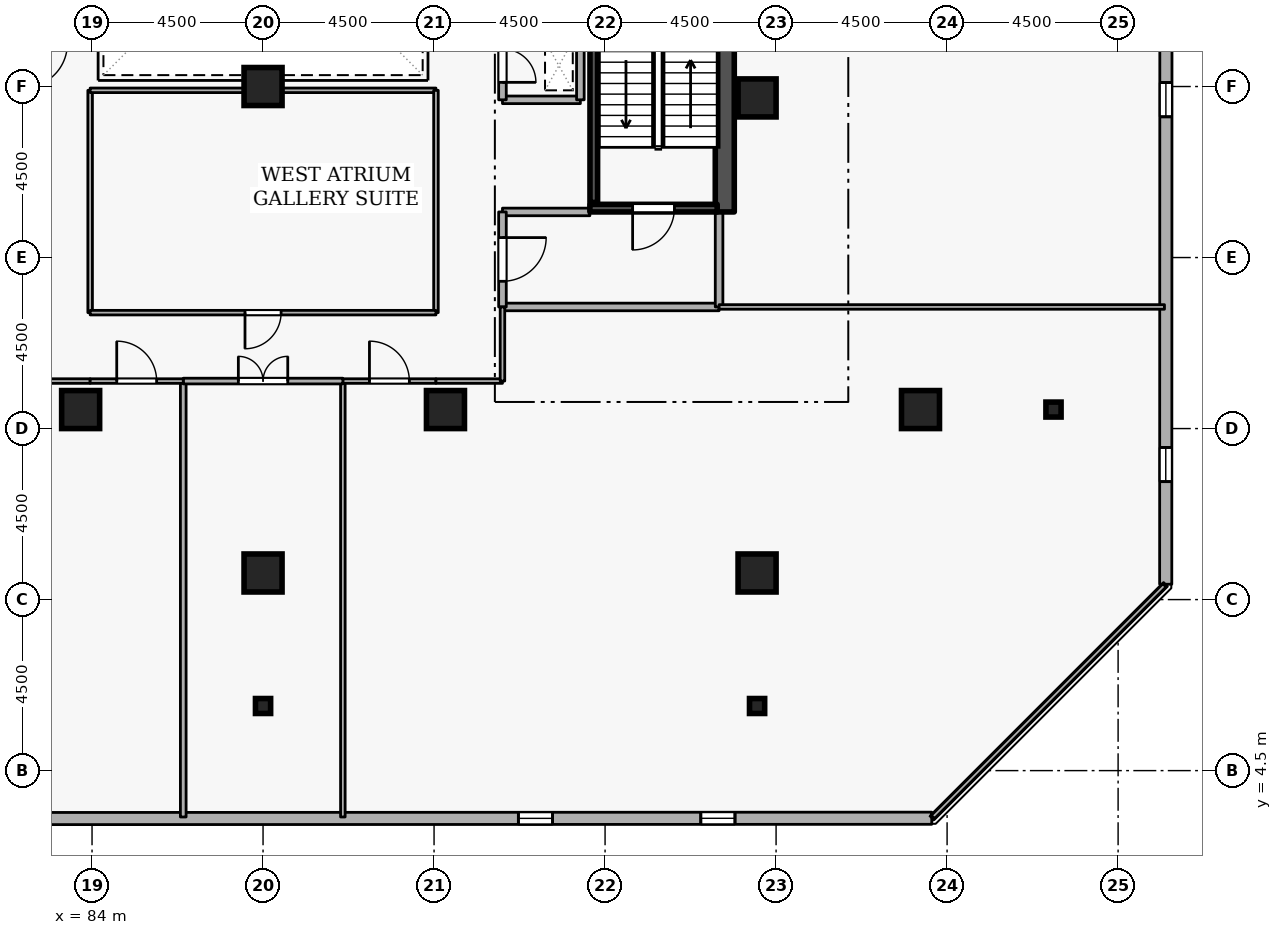
"""IFC4 building model, lengths in metres.
Left out: names, types, materials, properties, quantities, classifications, styles, units other than length and angle.
Written with IfcOpenShell. Run it as: python <this file> out.ifc"""

import sys

from ifc_helpers import new_model, si_unit, direction, frame, frame_2d, origin, origin_2d, place, context, subcontext, project, spatial, rectangle, i_section, extrude, element, fill, save


model = new_model("IFC4")
c1 = context("Model", 3, precision=1e-05, world=origin(), true_north=direction((0.0, 1.0)))
c2 = subcontext(c1, "Body", "Model", "MODEL_VIEW")
j1 = project(units=[si_unit("LENGTHUNIT", "METRE"), si_unit("PLANEANGLEUNIT", "RADIAN")], contexts=[c1])
p1 = place(None, origin())
s1 = spatial("IfcSite", under=j1, at=p1, CompositionType="ELEMENT")
p2 = place(p1, origin())
s2 = spatial("IfcBuilding", under=s1, at=p2, CompositionType="ELEMENT")
p3 = place(p2, frame((0.0, 0.0, 229.5)))
s3 = spatial("IfcBuildingStorey", under=s2, at=p3, CompositionType="ELEMENT", Elevation=229.5)
p4 = place(p3, frame((100.65, 19.2, 0.0), z_axis=(0.0, 0.0, 1.0), x_axis=(0.0, 1.0, 0.0)))
e1 = element("IfcWall", 1, at=p4, inside=s3, PredefinedType="SHEAR", context=c2, shape_type="SweptSolid", body=[
    extrude(rectangle(XDim=15.6, YDim=0.5, at=frame_2d((7.8, 0.0))), origin(), (0.0, 0.0, 1.0), 3.6),
])
for number, where, z_axis, x_axis in (
    (2, (105.8, 14.0, 0.0), (0.0, 0.0, 1.0), (1.0, 0.0, 0.0)),
    (3, (101.5, 9.7, 0.0), (0.0, 0.0, 1.0), (1.0, 0.0, 0.0)),
    (4, (88.5, 9.7, 0.0), (0.0, 0.0, 1.0), (1.0, 0.0, 0.0)),
    (5, (93.3, 14.0, 0.0), (0.0, 0.0, 1.0), (1.0, 0.0, 0.0)),
    (6, (83.7, 14.0, 0.0), (0.0, 0.0, 1.0), (1.0, 0.0, 0.0)),
    (7, (101.5, 22.2, 0.0), (0.0, 0.0, 1.0), (1.0, 0.0, 0.0)),
    (8, (88.5, 22.5, 0.0), (0.0, 0.0, 1.0), (1.0, 0.0, 0.0)),
):
    element("IfcColumn", number, at=place(p3, frame(where, z_axis=z_axis, x_axis=x_axis)), inside=s3, PredefinedType="COLUMN", context=c2, shape_type="SweptSolid", body=[
        extrude(rectangle(XDim=1.0, YDim=1.0, at=origin_2d()), origin(), (0.0, 0.0, 1.0), 3.6),
    ])
for number, where, z_axis, x_axis in (
    (9, (109.3, 14.0, 0.0), (0.0, 0.0, 1.0), (1.0, 0.0, 0.0)),
    (10, (101.5, 6.2, 0.0), (0.0, 0.0, 1.0), (1.0, 0.0, 0.0)),
    (11, (88.5, 6.2, 0.0), (0.0, 0.0, 1.0), (1.0, 0.0, 0.0)),
):
    element("IfcColumn", number, at=place(p3, frame(where, z_axis=z_axis, x_axis=x_axis)), inside=s3, PredefinedType="COLUMN", context=c2, shape_type="SweptSolid", body=[
        extrude(i_section(OverallWidth=0.399, OverallDepth=0.394, WebThickness=0.023, FlangeThickness=0.037, FilletRadius=0.015, at=origin_2d()), origin(), (0.0, 0.0, 1.0), 3.6),
    ])
p5 = place(p3, frame((73.319, 3.235, 0.0), z_axis=(0.0, 0.0, 1.0), x_axis=(0.999999933399, 0.000364968916, 0.0)))
e12 = element("IfcWall", 12, at=p5, inside=s3, PredefinedType="STANDARD", context=c2, shape_type="SweptSolid", body=[
    extrude(rectangle(XDim=32.778, YDim=0.32, at=frame_2d((16.389, 0.0))), origin(), (0.0, 0.0, 1.0), 2.7),
])
p6 = place(p5, frame((2.7, 0.0, 0.72)))
e13 = element("IfcOpeningElement", 13, at=p6, cuts=e12, PredefinedType="OPENING", context=c2, shape_type="SweptSolid", body=[
    extrude(rectangle(XDim=0.9, YDim=1.75, at=frame_2d((0.45, 0.875))), frame((0.0, 0.17, 0.0), z_axis=(0.0, -1.0, 0.0), x_axis=(1.0, 0.0, 0.0)), (0.0, 0.0, 1.0), 0.34),
])
p7 = place(p5, frame((7.5, 0.0, 0.72)))
e14 = element("IfcOpeningElement", 14, at=p7, cuts=e12, PredefinedType="OPENING", context=c2, shape_type="SweptSolid", body=[
    extrude(rectangle(XDim=0.9, YDim=1.75, at=frame_2d((0.45, 0.875))), frame((0.0, 0.17, 0.0), z_axis=(0.0, -1.0, 0.0), x_axis=(1.0, 0.0, 0.0)), (0.0, 0.0, 1.0), 0.34),
])
p8 = place(p5, frame((21.9, 0.0, 0.72)))
e15 = element("IfcOpeningElement", 15, at=p8, cuts=e12, PredefinedType="OPENING", context=c2, shape_type="SweptSolid", body=[
    extrude(rectangle(XDim=0.9, YDim=1.75, at=frame_2d((0.45, 0.875))), frame((0.0, 0.17, 0.0), z_axis=(0.0, -1.0, 0.0), x_axis=(1.0, 0.0, 0.0)), (0.0, 0.0, 1.0), 0.34),
])
p9 = place(p5, frame((26.7, 0.0, 0.72)))
e16 = element("IfcOpeningElement", 16, at=p9, cuts=e12, PredefinedType="OPENING", context=c2, shape_type="SweptSolid", body=[
    extrude(rectangle(XDim=0.9, YDim=1.75, at=frame_2d((0.45, 0.875))), frame((0.0, 0.17, 0.0), z_axis=(0.0, -1.0, 0.0), x_axis=(1.0, 0.0, 0.0)), (0.0, 0.0, 1.0), 0.34),
])
p10 = place(p3, frame((112.253, 9.404, 0.0), z_axis=(0.0, 0.0, 1.0), x_axis=(0.000364968916, 0.999999933399, 0.0)))
e17 = element("IfcWall", 17, at=p10, inside=s3, PredefinedType="STANDARD", context=c2, shape_type="SweptSolid", body=[
    extrude(rectangle(XDim=32.778, YDim=0.32, at=frame_2d((16.389, 0.0))), origin(), (0.0, 0.0, 1.0), 2.7),
])
p11 = place(p10, frame((2.7, 0.0, 0.72)))
e18 = element("IfcOpeningElement", 18, at=p11, cuts=e17, PredefinedType="OPENING", context=c2, shape_type="SweptSolid", body=[
    extrude(rectangle(XDim=0.9, YDim=1.75, at=frame_2d((0.45, 0.875))), frame((0.0, 0.17, 0.0), z_axis=(0.0, -1.0, 0.0), x_axis=(1.0, 0.0, 0.0)), (0.0, 0.0, 1.0), 0.34),
])
p12 = place(p10, frame((12.3, 0.0, 0.72)))
e19 = element("IfcOpeningElement", 19, at=p12, cuts=e17, PredefinedType="OPENING", context=c2, shape_type="SweptSolid", body=[
    extrude(rectangle(XDim=0.9, YDim=1.75, at=frame_2d((0.45, 0.875))), frame((0.0, 0.17, 0.0), z_axis=(0.0, -1.0, 0.0), x_axis=(1.0, 0.0, 0.0)), (0.0, 0.0, 1.0), 0.34),
])
p13 = place(p10, frame((17.1, 0.0, 0.72)))
e20 = element("IfcOpeningElement", 20, at=p13, cuts=e17, PredefinedType="OPENING", context=c2, shape_type="SweptSolid", body=[
    extrude(rectangle(XDim=0.9, YDim=1.75, at=frame_2d((0.45, 0.875))), frame((0.0, 0.17, 0.0), z_axis=(0.0, -1.0, 0.0), x_axis=(1.0, 0.0, 0.0)), (0.0, 0.0, 1.0), 0.34),
])
p14 = place(p10, frame((21.9, 0.0, 0.72)))
e21 = element("IfcOpeningElement", 21, at=p14, cuts=e17, PredefinedType="OPENING", context=c2, shape_type="SweptSolid", body=[
    extrude(rectangle(XDim=0.9, YDim=1.75, at=frame_2d((0.45, 0.875))), frame((0.0, 0.17, 0.0), z_axis=(0.0, -1.0, 0.0), x_axis=(1.0, 0.0, 0.0)), (0.0, 0.0, 1.0), 0.34),
])
p15 = place(p10, frame((26.7, 0.0, 0.72)))
e22 = element("IfcOpeningElement", 22, at=p15, cuts=e17, PredefinedType="OPENING", context=c2, shape_type="SweptSolid", body=[
    extrude(rectangle(XDim=0.9, YDim=1.75, at=frame_2d((0.45, 0.875))), frame((0.0, 0.17, 0.0), z_axis=(0.0, -1.0, 0.0), x_axis=(1.0, 0.0, 0.0)), (0.0, 0.0, 1.0), 0.34),
])
p16 = place(p3, frame((100.45, 19.3, 0.0), z_axis=(0.0, 0.0, 1.0), x_axis=(-1.0, 0.0, 0.0)))
e23 = element("IfcWall", 23, at=p16, inside=s3, PredefinedType="SHEAR", context=c2, shape_type="SweptSolid", body=[
    extrude(rectangle(XDim=3.35, YDim=0.2, at=frame_2d((1.675, 0.0))), origin(), (0.0, 0.0, 1.0), 3.6),
])
p17 = place(p16, frame((1.125, 0.0, 0.0)))
e24 = element("IfcOpeningElement", 24, at=p17, cuts=e23, PredefinedType="OPENING", context=c2, shape_type="SweptSolid", body=[
    extrude(rectangle(XDim=1.1, YDim=2.1, at=frame_2d((0.55, 1.05))), frame((0.0, 0.11, 0.0), z_axis=(0.0, -1.0, 0.0), x_axis=(1.0, 0.0, 0.0)), (0.0, 0.0, 1.0), 0.22),
])
p18 = place(p3, frame((97.203, 26.55, 0.0), z_axis=(0.0, 0.0, 1.0), x_axis=(0.0, -1.0, 0.0)))
e25 = element("IfcWall", 25, at=p18, inside=s3, PredefinedType="SHEAR", context=c2, shape_type="SweptSolid", body=[
    extrude(rectangle(XDim=7.1, YDim=0.2, at=frame_2d((3.55, 0.0))), origin(), (0.0, 0.0, 1.0), 3.6),
])
p19 = place(p3, frame((94.8, 16.7, 0.0), z_axis=(0.0, 0.0, 1.0), x_axis=(1.0, 0.0, 0.0)))
e26 = element("IfcWall", 26, at=p19, inside=s3, PredefinedType="STANDARD", context=c2, shape_type="SweptSolid", body=[
    extrude(rectangle(XDim=5.7, YDim=0.2, at=frame_2d((2.85, 0.0))), origin(), (0.0, 0.0, 1.0), 3.3),
])
p20 = place(p3, frame((100.5, 16.7, 0.0), z_axis=(0.0, 0.0, 1.0), x_axis=(0.0, 1.0, 0.0)))
e27 = element("IfcWall", 27, at=p20, inside=s3, PredefinedType="STANDARD", context=c2, shape_type="SweptSolid", body=[
    extrude(rectangle(XDim=2.5, YDim=0.2, at=frame_2d((1.25, 0.0))), origin(), (0.0, 0.0, 1.0), 3.3),
])
p21 = place(p3, frame((97.1, 19.2, 0.0), z_axis=(0.0, 0.0, 1.0), x_axis=(-1.0, 0.0, 0.0)))
e28 = element("IfcWall", 28, at=p21, inside=s3, PredefinedType="STANDARD", context=c2, shape_type="SweptSolid", body=[
    extrude(rectangle(XDim=2.3, YDim=0.2, at=frame_2d((1.15, 0.0))), origin(), (0.0, 0.0, 1.0), 2.505),
])
p22 = place(p3, frame((94.8, 19.2, 0.0), z_axis=(0.0, 0.0, 1.0), x_axis=(0.0, -1.0, 0.0)))
e29 = element("IfcWall", 29, at=p22, inside=s3, PredefinedType="STANDARD", context=c2, shape_type="SweptSolid", body=[
    extrude(rectangle(XDim=2.5, YDim=0.2, at=frame_2d((1.25, 0.0))), origin(), (0.0, 0.0, 1.0), 3.3),
])
p23 = place(p22, frame((0.675, 0.0, 0.0)))
e30 = element("IfcOpeningElement", 30, at=p23, cuts=e29, PredefinedType="OPENING", context=c2, shape_type="SweptSolid", body=[
    extrude(rectangle(XDim=1.15, YDim=2.1, at=frame_2d((0.575, 1.05))), frame((0.0, 0.11, 0.0), z_axis=(0.0, -1.0, 0.0), x_axis=(1.0, 0.0, 0.0)), (0.0, 0.0, 1.0), 0.22),
])
p24 = place(p3, frame((94.8, 22.15, 0.0), z_axis=(0.0, 0.0, 1.0), x_axis=(1.0, 0.0, 0.0)))
e31 = element("IfcWall", 31, at=p24, inside=s3, PredefinedType="STANDARD", context=c2, shape_type="SweptSolid", body=[
    extrude(rectangle(XDim=2.05, YDim=0.2, at=frame_2d((1.025, 0.0))), origin(), (0.0, 0.0, 1.0), 3.3),
])
p25 = place(p3, frame((96.85, 22.15, 0.0), z_axis=(0.0, 0.0, 1.0), x_axis=(0.0, 1.0, 0.0)))
e32 = element("IfcWall", 32, at=p25, inside=s3, PredefinedType="STANDARD", context=c2, shape_type="SweptSolid", body=[
    extrude(rectangle(XDim=1.8, YDim=0.2, at=frame_2d((0.9, 0.0))), origin(), (0.0, 0.0, 1.0), 3.3),
])
p26 = place(p3, frame((94.8, 23.95, 0.0), z_axis=(0.0, 0.0, 1.0), x_axis=(0.0, -1.0, 0.0)))
e33 = element("IfcWall", 33, at=p26, inside=s3, PredefinedType="STANDARD", context=c2, shape_type="SweptSolid", body=[
    extrude(rectangle(XDim=1.8, YDim=0.2, at=frame_2d((0.9, 0.0))), origin(), (0.0, 0.0, 1.0), 3.3),
])
p27 = place(p26, frame((0.46, 0.0, 0.0)))
e34 = element("IfcOpeningElement", 34, at=p27, cuts=e33, PredefinedType="OPENING", context=c2, shape_type="SweptSolid", body=[
    extrude(rectangle(XDim=0.88, YDim=2.04, at=frame_2d((0.44, 1.02))), frame((0.0, 0.11, 0.0), z_axis=(0.0, -1.0, 0.0), x_axis=(1.0, 0.0, 0.0)), (0.0, 0.0, 1.0), 0.22),
])
p28 = place(p3, frame((90.6, 3.28, 0.0), z_axis=(0.0, 0.0, 1.0), x_axis=(0.0, 1.0, 0.0)))
e35 = element("IfcWall", 35, at=p28, inside=s3, PredefinedType="PARTITIONING", context=c2, shape_type="SweptSolid", body=[
    extrude(rectangle(XDim=11.47, YDim=0.12, at=frame_2d((5.735, 0.0))), origin(), (0.0, 0.0, 1.0), 3.3),
])
p29 = place(p3, frame((90.6, 14.75, 0.0), z_axis=(0.0, 0.0, 1.0), x_axis=(1.0, 0.0, 0.0)))
e36 = element("IfcWall", 36, at=p29, inside=s3, PredefinedType="PARTITIONING", context=c2, shape_type="SweptSolid", body=[
    extrude(rectangle(XDim=2.45, YDim=0.12, at=frame_2d((1.225, 0.0))), origin(), (0.0, 0.0, 1.0), 3.3),
])
p30 = place(p29, frame((0.7, 0.0, 0.0)))
e37 = element("IfcOpeningElement", 37, at=p30, cuts=e36, PredefinedType="OPENING", context=c2, shape_type="SweptSolid", body=[
    extrude(rectangle(XDim=1.05, YDim=2.1, at=frame_2d((0.525, 1.05))), frame((0.0, 0.07, 0.0), z_axis=(0.0, -1.0, 0.0), x_axis=(1.0, 0.0, 0.0)), (0.0, 0.0, 1.0), 0.14),
])
p31 = place(p3, frame((93.05, 14.75, 0.0), z_axis=(0.0, 0.0, 1.0), x_axis=(1.0, 0.0, 0.0)))
e38 = element("IfcWall", 38, at=p31, inside=s3, PredefinedType="PARTITIONING", context=c2, shape_type="SweptSolid", body=[
    extrude(rectangle(XDim=1.75, YDim=0.12, at=frame_2d((0.875, 0.0))), origin(), (0.0, 0.0, 1.0), 3.3),
])
p32 = place(p3, frame((94.8, 14.75, 0.0), z_axis=(0.0, 0.0, 1.0), x_axis=(0.0, 1.0, 0.0)))
e39 = element("IfcWall", 39, at=p32, inside=s3, PredefinedType="PARTITIONING", context=c2, shape_type="SweptSolid", body=[
    extrude(rectangle(XDim=1.95, YDim=0.12, at=frame_2d((0.975, 0.0))), origin(), (0.0, 0.0, 1.0), 3.3),
])
p33 = place(p3, frame((100.5, 16.7, 0.0), z_axis=(0.0, 0.0, 1.0), x_axis=(1.0, 0.0, 0.0)))
e40 = element("IfcWall", 40, at=p33, inside=s3, PredefinedType="PARTITIONING", context=c2, shape_type="SweptSolid", body=[
    extrude(rectangle(XDim=11.72, YDim=0.12, at=frame_2d((5.86, 0.0))), origin(), (0.0, 0.0, 1.0), 3.3),
])
p34 = place(p3, frame((112.22, 9.375, 0.0), z_axis=(0.0, 0.0, 1.0), x_axis=(-0.707106781187, -0.707106781187, 0.0)))
e41 = element("IfcWall", 41, at=p34, inside=s3, PredefinedType="PARTITIONING", context=c2, shape_type="SweptSolid", body=[
    extrude(rectangle(XDim=8.619, YDim=0.12, at=frame_2d((4.31, 0.0))), origin(), (0.0, 0.0, 1.0), 3.3),
])
p35 = place(p3, frame((86.4, 3.28, 0.0), z_axis=(0.0, 0.0, 1.0), x_axis=(0.0, 1.0, 0.0)))
e42 = element("IfcWall", 42, at=p35, inside=s3, PredefinedType="PARTITIONING", context=c2, shape_type="SweptSolid", body=[
    extrude(rectangle(XDim=11.47, YDim=0.15, at=frame_2d((5.735, 0.0))), origin(), (0.0, 0.0, 1.0), 3.3),
])
p36 = place(p3, frame((86.4, 14.75, 0.0), z_axis=(0.0, 0.0, 1.0), x_axis=(1.0, 0.0, 0.0)))
e43 = element("IfcWall", 43, at=p36, inside=s3, PredefinedType="PARTITIONING", context=c2, shape_type="SweptSolid", body=[
    extrude(rectangle(XDim=4.2, YDim=0.15, at=frame_2d((2.1, 0.0))), origin(), (0.0, 0.0, 1.0), 3.3),
])
p37 = place(p36, frame((1.45, 0.0, 0.0)))
e44 = element("IfcOpeningElement", 44, at=p37, cuts=e43, PredefinedType="OPENING", context=c2, shape_type="SweptSolid", body=[
    extrude(rectangle(XDim=1.3, YDim=2.12, at=frame_2d((0.65, 1.06))), frame((0.0, 0.085, 0.0), z_axis=(0.0, -1.0, 0.0), x_axis=(1.0, 0.0, 0.0)), (0.0, 0.0, 1.0), 0.17),
])
p38 = place(p3, frame((82.2, 14.75, 0.0), z_axis=(0.0, 0.0, 1.0), x_axis=(1.0, 0.0, 0.0)))
e45 = element("IfcWall", 45, at=p38, inside=s3, PredefinedType="PARTITIONING", context=c2, shape_type="SweptSolid", body=[
    extrude(rectangle(XDim=1.75, YDim=0.12, at=frame_2d((0.875, 0.0))), origin(), (0.0, 0.0, 1.0), 3.3),
])
p39 = place(p3, frame((83.95, 14.75, 0.0), z_axis=(0.0, 0.0, 1.0), x_axis=(1.0, 0.0, 0.0)))
e46 = element("IfcWall", 46, at=p39, inside=s3, PredefinedType="PARTITIONING", context=c2, shape_type="SweptSolid", body=[
    extrude(rectangle(XDim=2.45, YDim=0.12, at=frame_2d((1.225, 0.0))), origin(), (0.0, 0.0, 1.0), 3.3),
])
p40 = place(p39, frame((0.7, 0.0, 0.0)))
e47 = element("IfcOpeningElement", 47, at=p40, cuts=e46, PredefinedType="OPENING", context=c2, shape_type="SweptSolid", body=[
    extrude(rectangle(XDim=1.05, YDim=2.1, at=frame_2d((0.525, 1.05))), frame((0.0, 0.07, 0.0), z_axis=(0.0, -1.0, 0.0), x_axis=(1.0, 0.0, 0.0)), (0.0, 0.0, 1.0), 0.14),
])
p41 = place(p3, frame((83.95, 16.55, 0.0), z_axis=(0.0, 0.0, 1.0), x_axis=(0.0, 1.0, 0.0)))
e48 = element("IfcWall", 48, at=p41, inside=s3, PredefinedType="PARTITIONING", context=c2, shape_type="SweptSolid", body=[
    extrude(rectangle(XDim=5.85, YDim=0.12, at=frame_2d((2.925, 0.0))), origin(), (0.0, 0.0, 1.0), 3.3),
])
p42 = place(p3, frame((83.95, 22.4, 0.0), z_axis=(0.0, 0.0, 1.0), x_axis=(1.0, 0.0, 0.0)))
e49 = element("IfcWall", 49, at=p42, inside=s3, PredefinedType="PARTITIONING", context=c2, shape_type="SweptSolid", body=[
    extrude(rectangle(XDim=9.1, YDim=0.12, at=frame_2d((4.55, 0.0))), origin(), (0.0, 0.0, 1.0), 3.3),
])
p43 = place(p3, frame((93.05, 22.4, 0.0), z_axis=(0.0, 0.0, 1.0), x_axis=(0.0, -1.0, 0.0)))
e50 = element("IfcWall", 50, at=p43, inside=s3, PredefinedType="PARTITIONING", context=c2, shape_type="SweptSolid", body=[
    extrude(rectangle(XDim=5.85, YDim=0.12, at=frame_2d((2.925, 0.0))), origin(), (0.0, 0.0, 1.0), 3.3),
])
p44 = place(p3, frame((93.05, 16.55, 0.0), z_axis=(0.0, 0.0, 1.0), x_axis=(-1.0, 0.0, 0.0)))
e51 = element("IfcWall", 51, at=p44, inside=s3, PredefinedType="PARTITIONING", context=c2, shape_type="SweptSolid", body=[
    extrude(rectangle(XDim=9.1, YDim=0.12, at=frame_2d((4.55, 0.0))), origin(), (0.0, 0.0, 1.0), 3.3),
])
p45 = place(p44, frame((4.075, 0.0, 0.0)))
e52 = element("IfcOpeningElement", 52, at=p45, cuts=e51, PredefinedType="OPENING", context=c2, shape_type="SweptSolid", body=[
    extrude(rectangle(XDim=0.95, YDim=2.1, at=frame_2d((0.475, 1.05))), frame((0.0, 0.07, 0.0), z_axis=(0.0, -1.0, 0.0), x_axis=(1.0, 0.0, 0.0)), (0.0, 0.0, 1.0), 0.14),
])
p46 = place(p8, origin())
e53 = element("IfcWindow", 53, at=p46, inside=s3, PartitioningType="SINGLE_PANEL", PredefinedType="WINDOW", context=c2, shape_type="SweptSolid", body=[
    extrude(rectangle(XDim=0.9, YDim=1.75, at=frame_2d((0.45, 0.875))), frame((0.0, 0.03, 0.0), z_axis=(0.0, -1.0, 0.0), x_axis=(1.0, 0.0, 0.0)), (0.0, 0.0, 1.0), 0.06),
])
fill(e15, e53)
p47 = place(p9, origin())
e54 = element("IfcWindow", 54, at=p47, inside=s3, PartitioningType="SINGLE_PANEL", PredefinedType="WINDOW", context=c2, shape_type="SweptSolid", body=[
    extrude(rectangle(XDim=0.9, YDim=1.75, at=frame_2d((0.45, 0.875))), frame((0.0, 0.03, 0.0), z_axis=(0.0, -1.0, 0.0), x_axis=(1.0, 0.0, 0.0)), (0.0, 0.0, 1.0), 0.06),
])
fill(e16, e54)
p48 = place(p11, origin())
e55 = element("IfcWindow", 55, at=p48, inside=s3, PartitioningType="SINGLE_PANEL", PredefinedType="WINDOW", context=c2, shape_type="SweptSolid", body=[
    extrude(rectangle(XDim=0.9, YDim=1.75, at=frame_2d((0.45, 0.875))), frame((0.0, 0.03, 0.0), z_axis=(0.0, -1.0, 0.0), x_axis=(1.0, 0.0, 0.0)), (0.0, 0.0, 1.0), 0.06),
])
fill(e18, e55)
p49 = place(p12, origin())
e56 = element("IfcWindow", 56, at=p49, inside=s3, PartitioningType="SINGLE_PANEL", PredefinedType="WINDOW", context=c2, shape_type="SweptSolid", body=[
    extrude(rectangle(XDim=0.9, YDim=1.75, at=frame_2d((0.45, 0.875))), frame((0.0, 0.03, 0.0), z_axis=(0.0, -1.0, 0.0), x_axis=(1.0, 0.0, 0.0)), (0.0, 0.0, 1.0), 0.06),
])
fill(e19, e56)
p50 = place(p17, origin())
e57 = element("IfcDoor", 57, at=p50, inside=s3, OperationType="SINGLE_SWING_RIGHT", PredefinedType="DOOR", context=c2, shape_type="SweptSolid", body=[
    extrude(rectangle(XDim=1.1, YDim=2.1, at=frame_2d((0.55, 1.05))), frame((0.0, 0.025, 0.0), z_axis=(0.0, -1.0, 0.0), x_axis=(1.0, 0.0, 0.0)), (0.0, 0.0, 1.0), 0.05),
])
fill(e24, e57)
p51 = place(p23, origin())
e58 = element("IfcDoor", 58, at=p51, inside=s3, OperationType="SINGLE_SWING_LEFT", PredefinedType="DOOR", context=c2, shape_type="SweptSolid", body=[
    extrude(rectangle(XDim=1.15, YDim=2.1, at=frame_2d((0.575, 1.05))), frame((0.0, 0.025, 0.0), z_axis=(0.0, -1.0, 0.0), x_axis=(1.0, 0.0, 0.0)), (0.0, 0.0, 1.0), 0.05),
])
fill(e30, e58)
p52 = place(p27, origin())
e59 = element("IfcDoor", 59, at=p52, inside=s3, OperationType="SINGLE_SWING_RIGHT", PredefinedType="DOOR", context=c2, shape_type="SweptSolid", body=[
    extrude(rectangle(XDim=0.88, YDim=2.04, at=frame_2d((0.44, 1.02))), frame((0.0, 0.025, 0.0), z_axis=(0.0, -1.0, 0.0), x_axis=(1.0, 0.0, 0.0)), (0.0, 0.0, 1.0), 0.05),
])
fill(e34, e59)
p53 = place(p30, origin())
e60 = element("IfcDoor", 60, at=p53, inside=s3, OperationType="SINGLE_SWING_LEFT", PredefinedType="DOOR", context=c2, shape_type="SweptSolid", body=[
    extrude(rectangle(XDim=1.05, YDim=2.1, at=frame_2d((0.525, 1.05))), frame((0.0, 0.025, 0.0), z_axis=(0.0, -1.0, 0.0), x_axis=(1.0, 0.0, 0.0)), (0.0, 0.0, 1.0), 0.05),
])
fill(e37, e60)
p54 = place(p37, origin())
e61 = element("IfcDoor", 61, at=p54, inside=s3, OperationType="DOUBLE_DOOR_SINGLE_SWING", PredefinedType="DOOR", context=c2, shape_type="SweptSolid", body=[
    extrude(rectangle(XDim=1.3, YDim=2.12, at=frame_2d((0.65, 1.06))), frame((0.0, 0.025, 0.0), z_axis=(0.0, -1.0, 0.0), x_axis=(1.0, 0.0, 0.0)), (0.0, 0.0, 1.0), 0.05),
])
fill(e44, e61)
p55 = place(p40, origin())
e62 = element("IfcDoor", 62, at=p55, inside=s3, OperationType="SINGLE_SWING_LEFT", PredefinedType="DOOR", context=c2, shape_type="SweptSolid", body=[
    extrude(rectangle(XDim=1.05, YDim=2.1, at=frame_2d((0.525, 1.05))), frame((0.0, 0.025, 0.0), z_axis=(0.0, -1.0, 0.0), x_axis=(1.0, 0.0, 0.0)), (0.0, 0.0, 1.0), 0.05),
])
fill(e47, e62)
p56 = place(p45, origin())
e63 = element("IfcDoor", 63, at=p56, inside=s3, OperationType="SINGLE_SWING_RIGHT", PredefinedType="DOOR", context=c2, shape_type="SweptSolid", body=[
    extrude(rectangle(XDim=0.95, YDim=2.1, at=frame_2d((0.475, 1.05))), frame((0.0, 0.025, 0.0), z_axis=(0.0, -1.0, 0.0), x_axis=(1.0, 0.0, 0.0)), (0.0, 0.0, 1.0), 0.05),
])
fill(e52, e63)
save(model, sys.argv[1])
